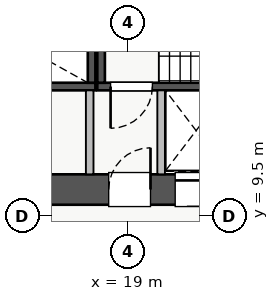
"""IFC4 building model, lengths in metres.
Left out: names, types, materials, properties, quantities, classifications, styles, units other than length and angle.
Written with IfcOpenShell. Run it as: python <this file> out.ifc"""

import sys

from ifc_helpers import new_model, si_unit, direction, frame, frame_2d, origin, place, context, subcontext, project, spatial, rectangle, extrude, source, transform, mapped, element, fill, save


model = new_model("IFC4")
c1 = context("Model", 3, precision=1e-05, world=origin(), true_north=direction((0.0, 1.0)))
c2 = subcontext(c1, "Body", "Model", "MODEL_VIEW")
j1 = project(units=[si_unit("LENGTHUNIT", "METRE"), si_unit("PLANEANGLEUNIT", "RADIAN")], contexts=[c1])
p1 = place(None, origin())
s1 = spatial("IfcSite", under=j1, at=p1, CompositionType="ELEMENT")
p2 = place(p1, origin())
s2 = spatial("IfcBuilding", under=s1, at=p2, CompositionType="ELEMENT")
p3 = place(p2, frame((0.0, 0.0, 32.75)))
s3 = spatial("IfcBuildingStorey", under=s2, at=p3, CompositionType="ELEMENT", Elevation=32.75)
p4 = place(p3, frame((19.88, 12.8, 0.0), z_axis=(0.0, 0.0, 1.0), x_axis=(1.0, 0.0, 0.0)))
e1 = element("IfcWall", 1, at=p4, inside=s3, PredefinedType="SHEAR", context=c2, shape_type="SweptSolid", body=[
    extrude(rectangle(XDim=1.87, YDim=0.18, at=frame_2d((0.935, 0.0))), origin(), (0.0, 0.0, 1.0), 3.07),
])
p5 = place(p3, frame((11.0, 12.91, 0.0), z_axis=(0.0, 0.0, 1.0), x_axis=(1.0, 0.0, 0.0)))
e2 = element("IfcWall", 2, at=p5, inside=s3, PredefinedType="SHEAR", context=c2, shape_type="SweptSolid", body=[
    extrude(rectangle(XDim=7.15, YDim=0.2, at=frame_2d((3.575, 0.0))), origin(), (0.0, 0.0, 1.0), 3.25),
])
p6 = place(p5, frame((0.35, 0.0, 0.0)))
e3 = element("IfcOpeningElement", 3, at=p6, cuts=e2, PredefinedType="OPENING", context=c2, shape_type="SweptSolid", body=[
    extrude(rectangle(XDim=1.1, YDim=2.05, at=frame_2d((0.55, 1.025))), frame((0.0, 0.11, 0.0), z_axis=(0.0, -1.0, 0.0), x_axis=(1.0, 0.0, 0.0)), (0.0, 0.0, 1.0), 0.22),
])
p7 = place(p3, frame((18.05, 13.01, 0.0), z_axis=(0.0, 0.0, 1.0), x_axis=(0.0, 1.0, 0.0)))
e4 = element("IfcWall", 4, at=p7, inside=s3, PredefinedType="SHEAR", context=c2, shape_type="SweptSolid", body=[
    extrude(rectangle(XDim=2.94, YDim=0.2, at=frame_2d((1.47, 0.0))), origin(), (0.0, 0.0, 1.0), 3.25),
])
p8 = place(p3, frame((18.2, 12.91, 0.0), z_axis=(0.0, 0.0, 1.0), x_axis=(1.0, 0.0, 0.0)))
e5 = element("IfcWall", 5, at=p8, inside=s3, PredefinedType="SHEAR", context=c2, shape_type="SweptSolid", body=[
    extrude(rectangle(XDim=7.15, YDim=0.2, at=frame_2d((3.575, 0.0))), origin(), (0.0, 0.0, 1.0), 3.25),
])
p9 = place(p8, frame((0.35, 0.0, 0.0)))
e6 = element("IfcOpeningElement", 6, at=p9, cuts=e5, PredefinedType="OPENING", context=c2, shape_type="SweptSolid", body=[
    extrude(rectangle(XDim=1.1, YDim=2.05, at=frame_2d((0.55, 1.025))), frame((0.0, 0.11, 0.0), z_axis=(0.0, -1.0, 0.0), x_axis=(1.0, 0.0, 0.0)), (0.0, 0.0, 1.0), 0.22),
])
p10 = place(p3, frame((18.3, 13.01, 0.0), z_axis=(0.0, 0.0, 1.0), x_axis=(0.0, 1.0, 0.0)))
e7 = element("IfcWall", 7, at=p10, inside=s3, PredefinedType="SHEAR", context=c2, shape_type="SweptSolid", body=[
    extrude(rectangle(XDim=2.94, YDim=0.2, at=frame_2d((1.47, 0.0))), origin(), (0.0, 0.0, 1.0), 3.25),
])
p11 = place(p3, frame((10.2, 10.2, 0.0), z_axis=(0.0, 0.0, 1.0), x_axis=(1.0, 0.0, 0.0)))
e8 = element("IfcWall", 8, at=p11, inside=s3, PredefinedType="SHEAR", context=c2, shape_type="SweptSolid", body=[
    extrude(rectangle(XDim=17.6, YDim=0.8, at=frame_2d((8.8, 0.0))), origin(), (0.0, 0.0, 1.0), 3.25),
])
p12 = place(p11, frame((1.15, 0.0, 0.0)))
e9 = element("IfcOpeningElement", 9, at=p12, cuts=e8, PredefinedType="OPENING", context=c2, shape_type="SweptSolid", body=[
    extrude(rectangle(XDim=1.1, YDim=2.05, at=frame_2d((0.55, 1.025))), frame((0.0, 0.41, 0.0), z_axis=(0.0, -1.0, 0.0), x_axis=(1.0, 0.0, 0.0)), (0.0, 0.0, 1.0), 0.82),
])
p13 = place(p11, frame((8.3, 0.0, 0.0)))
e10 = element("IfcOpeningElement", 10, at=p13, cuts=e8, PredefinedType="OPENING", context=c2, shape_type="SweptSolid", body=[
    extrude(rectangle(XDim=1.1, YDim=2.05, at=frame_2d((0.55, 1.025))), frame((0.0, 0.41, 0.0), z_axis=(0.0, -1.0, 0.0), x_axis=(1.0, 0.0, 0.0)), (0.0, 0.0, 1.0), 0.82),
])
p14 = place(p11, frame((10.05, 0.0, 0.0)))
e11 = element("IfcOpeningElement", 11, at=p14, cuts=e8, PredefinedType="OPENING", context=c2, shape_type="SweptSolid", body=[
    extrude(rectangle(XDim=1.1, YDim=2.05, at=frame_2d((0.55, 1.025))), frame((0.0, 0.41, 0.0), z_axis=(0.0, -1.0, 0.0), x_axis=(1.0, 0.0, 0.0)), (0.0, 0.0, 1.0), 0.82),
])
p15 = place(p11, frame((14.74, 0.0, 0.0)))
e12 = element("IfcOpeningElement", 12, at=p15, cuts=e8, PredefinedType="OPENING", context=c2, shape_type="SweptSolid", body=[
    extrude(rectangle(XDim=1.0, YDim=2.05, at=frame_2d((0.5, 1.025))), frame((0.0, 0.41, 0.0), z_axis=(0.0, -1.0, 0.0), x_axis=(1.0, 0.0, 0.0)), (0.0, 0.0, 1.0), 0.82),
])
p16 = place(p11, frame((11.835, 0.0, 0.0)))
e13 = element("IfcOpeningElement", 13, at=p16, cuts=e8, PredefinedType="OPENING", context=c2, shape_type="SweptSolid", body=[
    extrude(rectangle(XDim=1.0, YDim=2.05, at=frame_2d((0.5, 1.025))), frame((0.0, 0.41, 0.0), z_axis=(0.0, -1.0, 0.0), x_axis=(1.0, 0.0, 0.0)), (0.0, 0.0, 1.0), 0.82),
])
p17 = place(p11, frame((13.37, 0.0, 0.0)))
e14 = element("IfcOpeningElement", 14, at=p17, cuts=e8, PredefinedType="OPENING", context=c2, shape_type="SweptSolid", body=[
    extrude(rectangle(XDim=1.0, YDim=2.05, at=frame_2d((0.5, 1.025))), frame((0.0, 0.41, 0.0), z_axis=(0.0, -1.0, 0.0), x_axis=(1.0, 0.0, 0.0)), (0.0, 0.0, 1.0), 0.82),
])
for number, where, z_axis, x_axis in (
    (15, (18.0, 10.6, 0.0), (0.0, 0.0, 1.0), (0.0, 1.0, 0.0)),
    (16, (19.88, 10.6, 0.0), (0.0, 0.0, 1.0), (0.0, 1.0, 0.0)),
):
    element("IfcWall", number, at=place(p3, frame(where, z_axis=z_axis, x_axis=x_axis)), inside=s3, PredefinedType="PARTITIONING", context=c2, shape_type="SweptSolid", body=[
        extrude(rectangle(XDim=2.21, YDim=0.2, at=frame_2d((1.105, 0.0))), origin(), (0.0, 0.0, 1.0), 3.07),
    ])
m1 = source(origin(), c2, "Body", "SweptSolid", [
    extrude(rectangle(XDim=1.1, YDim=2.05, at=frame_2d((0.55, 1.025))), frame((0.0, 0.025, 0.0), z_axis=(0.0, -1.0, 0.0), x_axis=(1.0, 0.0, 0.0)), (0.0, 0.0, 1.0), 0.05),
])
p18 = place(p13, origin())
e17 = element("IfcDoor", 17, at=p18, inside=s3, OperationType="SINGLE_SWING_RIGHT", PredefinedType="DOOR", context=c2, shape_type="MappedRepresentation", body=[
    mapped(m1, transform((0.0, 0.0, 0.0), x_axis=(1.0, 0.0, 0.0), y_axis=(0.0, 1.0, 0.0), z_axis=(0.0, 0.0, 1.0), scale=1.0)),
])
fill(e10, e17)
p19 = place(p9, frame((1.1, 0.0, 0.0), z_axis=(0.0, 0.0, 1.0), x_axis=(-1.0, 0.0, 0.0)))
e18 = element("IfcDoor", 18, at=p19, inside=s3, OperationType="SINGLE_SWING_LEFT", PredefinedType="DOOR", context=c2, shape_type="MappedRepresentation", body=[
    mapped(m1, transform((0.0, 0.0, 0.0), x_axis=(1.0, 0.0, 0.0), y_axis=(0.0, 1.0, 0.0), z_axis=(0.0, 0.0, 1.0), scale=1.0)),
])
fill(e6, e18)
p20 = place(p14, origin())
e19 = element("IfcDoor", 19, at=p20, inside=s3, OperationType="SLIDING_TO_RIGHT", PredefinedType="DOOR", context=c2, shape_type="MappedRepresentation", body=[
    mapped(m1, transform((0.0, 0.0, 0.0), x_axis=(1.0, 0.0, 0.0), y_axis=(0.0, 1.0, 0.0), z_axis=(0.0, 0.0, 1.0), scale=1.0)),
])
fill(e11, e19)
save(model, sys.argv[1])
